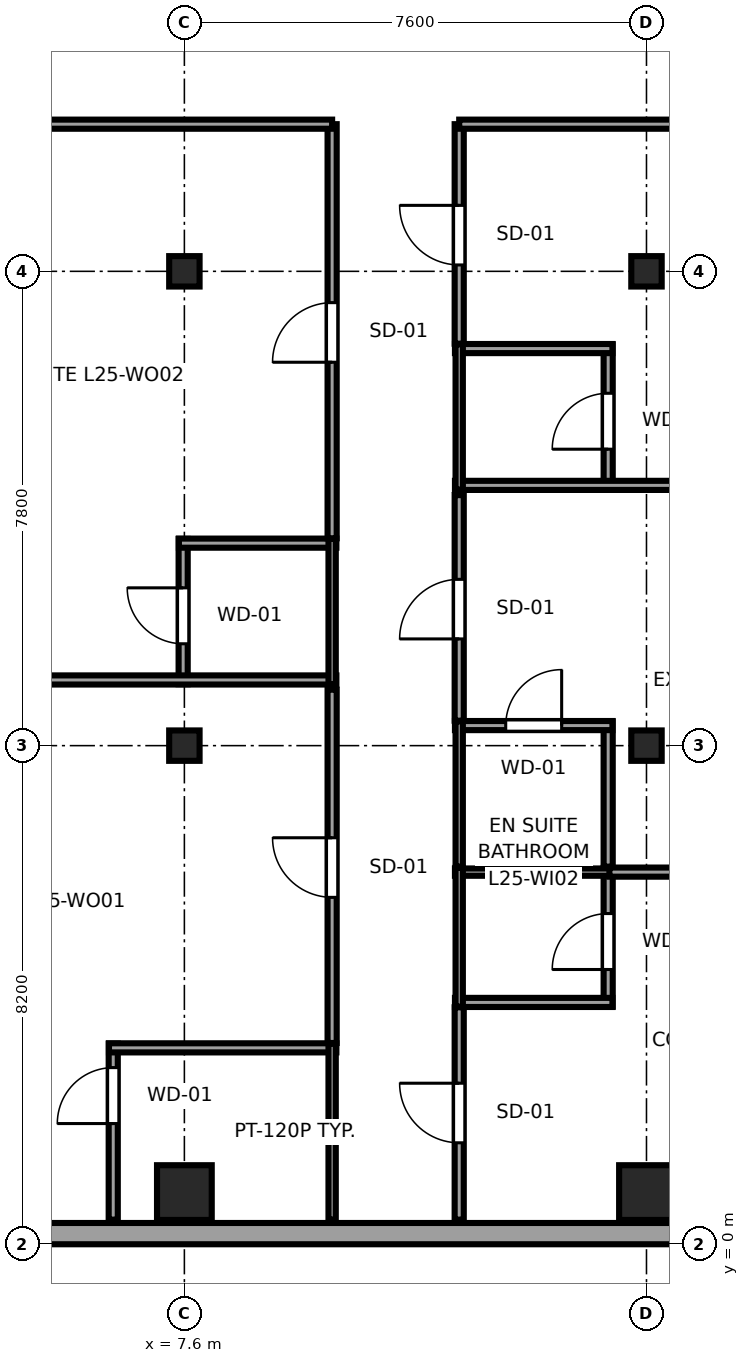
"""IFC4 building model, lengths in metres.
Left out: names, types, materials, properties, quantities, classifications, styles, units other than length and angle.
Written with IfcOpenShell. Run it as: python <this file> out.ifc"""

import sys

from ifc_helpers import new_model, si_unit, direction, frame, frame_2d, origin, origin_2d, place, context, subcontext, project, spatial, rectangle, i_section, extrude, source, transform, mapped, element, fill, save


model = new_model("IFC4")
c1 = context("Model", 3, precision=1e-05, world=origin(), true_north=direction((0.0, 1.0)))
c2 = subcontext(c1, "Body", "Model", "MODEL_VIEW")
j1 = project(units=[si_unit("LENGTHUNIT", "METRE"), si_unit("PLANEANGLEUNIT", "RADIAN")], contexts=[c1])
p1 = place(None, origin())
s1 = spatial("IfcSite", under=j1, at=p1, CompositionType="ELEMENT")
p2 = place(p1, origin())
s2 = spatial("IfcBuilding", under=s1, at=p2, CompositionType="ELEMENT")
p3 = place(p2, frame((0.0, 0.0, 100.9)))
s3 = spatial("IfcBuildingStorey", under=s2, at=p3, CompositionType="ELEMENT", Elevation=100.9)
m1 = source(origin(), c2, "Body", "SweptSolid", [
    extrude(rectangle(XDim=0.9, YDim=0.9, at=origin_2d()), origin(), (0.0, 0.0, 1.0), 3.55),
])
p4 = place(p3, frame((7.6, 0.85, 0.0), z_axis=(0.0, 0.0, 1.0), x_axis=(1.0, 0.0, 0.0)))
e1 = element("IfcColumn", 1, at=p4, inside=s3, PredefinedType="COLUMN", context=c2, shape_type="MappedRepresentation", body=[
    mapped(m1, transform((0.0, 0.0, 0.0), x_axis=(1.0, 0.0, 0.0), y_axis=(0.0, 1.0, 0.0), z_axis=(0.0, 0.0, 1.0), scale=1.0)),
])
m2 = source(origin(), c2, "Body", "SweptSolid", [
    extrude(i_section(OverallWidth=0.5, OverallDepth=0.5, WebThickness=0.022, FlangeThickness=0.034, at=origin_2d()), origin(), (0.0, 0.0, 1.0), 3.55),
])
for number, where, z_axis, x_axis in (
    (2, (7.6, 8.2, 0.0), (0.0, 0.0, 1.0), (1.0, 0.0, 0.0)),
    (3, (7.6, 16.0, 0.0), (0.0, 0.0, 1.0), (1.0, 0.0, 0.0)),
):
    element("IfcColumn", number, at=place(p3, frame(where, z_axis=z_axis, x_axis=x_axis)), inside=s3, PredefinedType="COLUMN", context=c2, shape_type="MappedRepresentation", body=[
        mapped(m2, transform((0.0, 0.0, 0.0), x_axis=(1.0, 0.0, 0.0), y_axis=(0.0, 1.0, 0.0), z_axis=(0.0, 0.0, 1.0), scale=1.0)),
    ])
p5 = place(p3, frame((15.2, 0.85, 0.0), z_axis=(0.0, 0.0, 1.0), x_axis=(1.0, 0.0, 0.0)))
e4 = element("IfcColumn", 4, at=p5, inside=s3, PredefinedType="COLUMN", context=c2, shape_type="MappedRepresentation", body=[
    mapped(m1, transform((0.0, 0.0, 0.0), x_axis=(1.0, 0.0, 0.0), y_axis=(0.0, 1.0, 0.0), z_axis=(0.0, 0.0, 1.0), scale=1.0)),
])
for number, where, z_axis, x_axis in (
    (5, (15.2, 8.2, 0.0), (0.0, 0.0, 1.0), (1.0, 0.0, 0.0)),
    (6, (15.2, 16.0, 0.0), (0.0, 0.0, 1.0), (1.0, 0.0, 0.0)),
):
    element("IfcColumn", number, at=place(p3, frame(where, z_axis=z_axis, x_axis=x_axis)), inside=s3, PredefinedType="COLUMN", context=c2, shape_type="MappedRepresentation", body=[
        mapped(m2, transform((0.0, 0.0, 0.0), x_axis=(1.0, 0.0, 0.0), y_axis=(0.0, 1.0, 0.0), z_axis=(0.0, 0.0, 1.0), scale=1.0)),
    ])
p6 = place(p3, frame((4.617, 0.175, 0.0), z_axis=(0.0, 0.0, 1.0), x_axis=(1.0, 0.0, 0.0)))
e7 = element("IfcWall", 7, at=p6, inside=s3, PredefinedType="SOLIDWALL", context=c2, shape_type="SweptSolid", body=[
    extrude(rectangle(XDim=18.008, YDim=0.35, at=frame_2d((9.004, 0.0))), origin(), (0.0, 0.0, 1.0), 3.37),
])
p7 = place(p6, frame((14.332, 0.0, 0.68)))
e8 = element("IfcOpeningElement", 8, at=p7, cuts=e7, PredefinedType="OPENING", context=c2, shape_type="SweptSolid", body=[
    extrude(rectangle(XDim=1.95, YDim=1.82, at=frame_2d((0.975, 0.91))), frame((0.0, 0.185, 0.0), z_axis=(0.0, -1.0, 0.0), x_axis=(1.0, 0.0, 0.0)), (0.0, 0.0, 1.0), 0.37),
])
p8 = place(p3, frame((6.43, 0.405, 0.0), z_axis=(0.0, 0.0, 1.0), x_axis=(0.0, 1.0, 0.0)))
e9 = element("IfcWall", 9, at=p8, inside=s3, PredefinedType="PARTITIONING", context=c2, shape_type="SweptSolid", body=[
    extrude(rectangle(XDim=2.895, YDim=0.15, at=frame_2d((1.448, 0.0))), origin(), (0.0, 0.0, 1.0), 3.37),
])
p9 = place(p8, frame((1.58, 0.0, 0.0)))
e10 = element("IfcOpeningElement", 10, at=p9, cuts=e9, PredefinedType="OPENING", context=c2, shape_type="SweptSolid", body=[
    extrude(rectangle(XDim=0.92, YDim=2.01, at=frame_2d((0.46, 1.005))), frame((0.0, 0.085, 0.0), z_axis=(0.0, -1.0, 0.0), x_axis=(1.0, 0.0, 0.0)), (0.0, 0.0, 1.0), 0.17),
])
p10 = place(p3, frame((6.36, 3.23, 0.0), z_axis=(0.0, 0.0, 1.0), x_axis=(1.0, 0.0, 0.0)))
e11 = element("IfcWall", 11, at=p10, inside=s3, PredefinedType="PARTITIONING", context=c2, shape_type="SweptSolid", body=[
    extrude(rectangle(XDim=3.74, YDim=0.15, at=frame_2d((1.87, 0.0))), origin(), (0.0, 0.0, 1.0), 3.37),
])
p11 = place(p3, frame((10.03, 0.405, 0.0), z_axis=(0.0, 0.0, 1.0), x_axis=(0.0, 1.0, 0.0)))
e12 = element("IfcWall", 12, at=p11, inside=s3, PredefinedType="PLUMBINGWALL", context=c2, shape_type="SweptSolid", body=[
    extrude(rectangle(XDim=2.895, YDim=0.12, at=frame_2d((1.448, 0.0))), origin(), (0.0, 0.0, 1.0), 3.37),
])
p12 = place(p3, frame((7.58, 9.21, 0.0), z_axis=(0.0, 0.0, 1.0), x_axis=(0.0, 1.0, 0.0)))
e13 = element("IfcWall", 13, at=p12, inside=s3, PredefinedType="PARTITIONING", context=c2, shape_type="SweptSolid", body=[
    extrude(rectangle(XDim=2.39, YDim=0.15, at=frame_2d((1.195, 0.0))), origin(), (0.0, 0.0, 1.0), 2.827),
])
p13 = place(p12, frame((0.665, 0.0, 0.0)))
e14 = element("IfcOpeningElement", 14, at=p13, cuts=e13, PredefinedType="OPENING", context=c2, shape_type="SweptSolid", body=[
    extrude(rectangle(XDim=0.92, YDim=2.01, at=frame_2d((0.46, 1.005))), frame((0.0, 0.085, 0.0), z_axis=(0.0, -1.0, 0.0), x_axis=(1.0, 0.0, 0.0)), (0.0, 0.0, 1.0), 0.17),
])
p14 = place(p3, frame((0.3, 9.28, 0.0), z_axis=(0.0, 0.0, 1.0), x_axis=(1.0, 0.0, 0.0)))
e15 = element("IfcWall", 15, at=p14, inside=s3, PredefinedType="PARTITIONING", context=c2, shape_type="SweptSolid", body=[
    extrude(rectangle(XDim=9.8, YDim=0.15, at=frame_2d((4.9, 0.0))), origin(), (0.0, 0.0, 1.0), 3.37),
])
p15 = place(p3, frame((7.51, 11.53, 0.0), z_axis=(0.0, 0.0, 1.0), x_axis=(1.0, 0.0, 0.0)))
e16 = element("IfcWall", 16, at=p15, inside=s3, PredefinedType="PARTITIONING", context=c2, shape_type="SweptSolid", body=[
    extrude(rectangle(XDim=2.59, YDim=0.15, at=frame_2d((1.295, 0.0))), origin(), (0.0, 0.0, 1.0), 3.37),
])
p16 = place(p3, frame((10.03, 9.21, 0.0), z_axis=(0.0, 0.0, 1.0), x_axis=(0.0, 1.0, 0.0)))
e17 = element("IfcWall", 17, at=p16, inside=s3, PredefinedType="PLUMBINGWALL", context=c2, shape_type="SweptSolid", body=[
    extrude(rectangle(XDim=2.39, YDim=0.12, at=frame_2d((1.195, 0.0))), origin(), (0.0, 0.0, 1.0), 3.37),
])
p17 = place(p3, frame((14.57, 3.907, 0.0), z_axis=(0.0, 0.0, 1.0), x_axis=(0.0, 1.0, 0.0)))
e18 = element("IfcWall", 18, at=p17, inside=s3, PredefinedType="PARTITIONING", context=c2, shape_type="SweptSolid", body=[
    extrude(rectangle(XDim=2.283, YDim=0.15, at=frame_2d((1.142, 0.0))), origin(), (0.0, 0.0, 1.0), 3.37),
])
p18 = place(p17, frame((0.612, 0.0, 0.0)))
e19 = element("IfcOpeningElement", 19, at=p18, cuts=e18, PredefinedType="OPENING", context=c2, shape_type="SweptSolid", body=[
    extrude(rectangle(XDim=0.92, YDim=2.01, at=frame_2d((0.46, 1.005))), frame((0.0, 0.085, 0.0), z_axis=(0.0, -1.0, 0.0), x_axis=(1.0, 0.0, 0.0)), (0.0, 0.0, 1.0), 0.17),
])
p19 = place(p3, frame((12.05, 3.977, 0.0), z_axis=(0.0, 0.0, 1.0), x_axis=(1.0, 0.0, 0.0)))
e20 = element("IfcWall", 20, at=p19, inside=s3, PredefinedType="PARTITIONING", context=c2, shape_type="SweptSolid", body=[
    extrude(rectangle(XDim=2.59, YDim=0.15, at=frame_2d((1.295, 0.0))), origin(), (0.0, 0.0, 1.0), 3.37),
])
p20 = place(p3, frame((12.05, 6.12, 0.0), z_axis=(0.0, 0.0, 1.0), x_axis=(1.0, 0.0, 0.0)))
e21 = element("IfcWall", 21, at=p20, inside=s3, PredefinedType="PLUMBINGWALL", context=c2, shape_type="SweptSolid", body=[
    extrude(rectangle(XDim=2.59, YDim=0.12, at=frame_2d((1.295, 0.0))), origin(), (0.0, 0.0, 1.0), 3.37),
])
p21 = place(p3, frame((12.12, 3.907, 0.0), z_axis=(0.0, 0.0, 1.0), x_axis=(0.0, 1.0, 0.0)))
e22 = element("IfcWall", 22, at=p21, inside=s3, PredefinedType="PLUMBINGWALL", context=c2, shape_type="SweptSolid", body=[
    extrude(rectangle(XDim=2.283, YDim=0.12, at=frame_2d((1.142, 0.0))), origin(), (0.0, 0.0, 1.0), 3.37),
])
p22 = place(p3, frame((14.57, 6.21, 0.0), z_axis=(0.0, 0.0, 1.0), x_axis=(0.0, 1.0, 0.0)))
e23 = element("IfcWall", 23, at=p22, inside=s3, PredefinedType="PARTITIONING", context=c2, shape_type="SweptSolid", body=[
    extrude(rectangle(XDim=2.39, YDim=0.15, at=frame_2d((1.195, 0.0))), origin(), (0.0, 0.0, 1.0), 3.37),
])
p23 = place(p3, frame((12.05, 8.53, 0.0), z_axis=(0.0, 0.0, 1.0), x_axis=(1.0, 0.0, 0.0)))
e24 = element("IfcWall", 24, at=p23, inside=s3, PredefinedType="PARTITIONING", context=c2, shape_type="SweptSolid", body=[
    extrude(rectangle(XDim=2.59, YDim=0.15, at=frame_2d((1.295, 0.0))), origin(), (0.0, 0.0, 1.0), 3.37),
])
p24 = place(p23, frame((0.835, 0.0, 0.0)))
e25 = element("IfcOpeningElement", 25, at=p24, cuts=e24, PredefinedType="OPENING", context=c2, shape_type="SweptSolid", body=[
    extrude(rectangle(XDim=0.92, YDim=2.01, at=frame_2d((0.46, 1.005))), frame((0.0, 0.085, 0.0), z_axis=(0.0, -1.0, 0.0), x_axis=(1.0, 0.0, 0.0)), (0.0, 0.0, 1.0), 0.17),
])
p25 = place(p3, frame((12.12, 6.21, 0.0), z_axis=(0.0, 0.0, 1.0), x_axis=(0.0, 1.0, 0.0)))
e26 = element("IfcWall", 26, at=p25, inside=s3, PredefinedType="PLUMBINGWALL", context=c2, shape_type="SweptSolid", body=[
    extrude(rectangle(XDim=2.39, YDim=0.12, at=frame_2d((1.195, 0.0))), origin(), (0.0, 0.0, 1.0), 3.37),
])
p26 = place(p3, frame((14.57, 12.41, 0.0), z_axis=(0.0, 0.0, 1.0), x_axis=(0.0, 1.0, 0.0)))
e27 = element("IfcWall", 27, at=p26, inside=s3, PredefinedType="PARTITIONING", context=c2, shape_type="SweptSolid", body=[
    extrude(rectangle(XDim=2.39, YDim=0.15, at=frame_2d((1.195, 0.0))), origin(), (0.0, 0.0, 1.0), 3.37),
])
p27 = place(p26, frame((0.665, 0.0, 0.0)))
e28 = element("IfcOpeningElement", 28, at=p27, cuts=e27, PredefinedType="OPENING", context=c2, shape_type="SweptSolid", body=[
    extrude(rectangle(XDim=0.92, YDim=2.01, at=frame_2d((0.46, 1.005))), frame((0.0, 0.085, 0.0), z_axis=(0.0, -1.0, 0.0), x_axis=(1.0, 0.0, 0.0)), (0.0, 0.0, 1.0), 0.17),
])
p28 = place(p3, frame((12.05, 12.48, 0.0), z_axis=(0.0, 0.0, 1.0), x_axis=(1.0, 0.0, 0.0)))
e29 = element("IfcWall", 29, at=p28, inside=s3, PredefinedType="PARTITIONING", context=c2, shape_type="SweptSolid", body=[
    extrude(rectangle(XDim=10.3, YDim=0.15, at=frame_2d((5.15, 0.0))), origin(), (0.0, 0.0, 1.0), 3.37),
])
p29 = place(p3, frame((12.05, 14.73, 0.0), z_axis=(0.0, 0.0, 1.0), x_axis=(1.0, 0.0, 0.0)))
e30 = element("IfcWall", 30, at=p29, inside=s3, PredefinedType="PARTITIONING", context=c2, shape_type="SweptSolid", body=[
    extrude(rectangle(XDim=2.59, YDim=0.15, at=frame_2d((1.295, 0.0))), origin(), (0.0, 0.0, 1.0), 3.37),
])
p30 = place(p3, frame((12.12, 12.41, 0.0), z_axis=(0.0, 0.0, 1.0), x_axis=(0.0, 1.0, 0.0)))
e31 = element("IfcWall", 31, at=p30, inside=s3, PredefinedType="PLUMBINGWALL", context=c2, shape_type="SweptSolid", body=[
    extrude(rectangle(XDim=2.39, YDim=0.12, at=frame_2d((1.195, 0.0))), origin(), (0.0, 0.0, 1.0), 3.37),
])
p31 = place(p3, frame((10.03, 3.31, 0.0), z_axis=(0.0, 0.0, 1.0), x_axis=(0.0, 1.0, 0.0)))
e32 = element("IfcWall", 32, at=p31, inside=s3, PredefinedType="PARTITIONING", context=c2, shape_type="SweptSolid", body=[
    extrude(rectangle(XDim=5.81, YDim=0.15, at=frame_2d((2.905, 0.0))), origin(), (0.0, 0.0, 1.0), 3.37),
])
p32 = place(p31, frame((2.395, 0.0, 0.0)))
e33 = element("IfcOpeningElement", 33, at=p32, cuts=e32, PredefinedType="OPENING", context=c2, shape_type="SweptSolid", body=[
    extrude(rectangle(XDim=0.98, YDim=2.12, at=frame_2d((0.49, 1.06))), frame((0.0, 0.085, 0.0), z_axis=(0.0, -1.0, 0.0), x_axis=(1.0, 0.0, 0.0)), (0.0, 0.0, 1.0), 0.17),
])
p33 = place(p3, frame((10.03, 11.61, 0.0), z_axis=(0.0, 0.0, 1.0), x_axis=(0.0, 1.0, 0.0)))
e34 = element("IfcWall", 34, at=p33, inside=s3, PredefinedType="PARTITIONING", context=c2, shape_type="SweptSolid", body=[
    extrude(rectangle(XDim=6.81, YDim=0.15, at=frame_2d((3.405, 0.0))), origin(), (0.0, 0.0, 1.0), 3.37),
])
p34 = place(p33, frame((2.895, 0.0, 0.0)))
e35 = element("IfcOpeningElement", 35, at=p34, cuts=e34, PredefinedType="OPENING", context=c2, shape_type="SweptSolid", body=[
    extrude(rectangle(XDim=0.98, YDim=2.12, at=frame_2d((0.49, 1.06))), frame((0.0, 0.085, 0.0), z_axis=(0.0, -1.0, 0.0), x_axis=(1.0, 0.0, 0.0)), (0.0, 0.0, 1.0), 0.17),
])
p35 = place(p3, frame((0.3, 18.42, 0.0), z_axis=(0.0, 0.0, 1.0), x_axis=(1.0, 0.0, 0.0)))
e36 = element("IfcWall", 36, at=p35, inside=s3, PredefinedType="PARTITIONING", context=c2, shape_type="SweptSolid", body=[
    extrude(rectangle(XDim=9.73, YDim=0.15, at=frame_2d((4.865, 0.0))), origin(), (0.0, 0.0, 1.0), 3.37),
])
p36 = place(p3, frame((12.12, 0.405, 0.0), z_axis=(0.0, 0.0, 1.0), x_axis=(0.0, 1.0, 0.0)))
e37 = element("IfcWall", 37, at=p36, inside=s3, PredefinedType="PARTITIONING", context=c2, shape_type="SweptSolid", body=[
    extrude(rectangle(XDim=3.492, YDim=0.15, at=frame_2d((1.746, 0.0))), origin(), (0.0, 0.0, 1.0), 3.37),
])
p37 = place(p36, frame((1.263, 0.0, 0.0)))
e38 = element("IfcOpeningElement", 38, at=p37, cuts=e37, PredefinedType="OPENING", context=c2, shape_type="SweptSolid", body=[
    extrude(rectangle(XDim=0.98, YDim=2.12, at=frame_2d((0.49, 1.06))), frame((0.0, 0.085, 0.0), z_axis=(0.0, -1.0, 0.0), x_axis=(1.0, 0.0, 0.0)), (0.0, 0.0, 1.0), 0.17),
])
p38 = place(p3, frame((14.59, 6.12, 0.0), z_axis=(0.0, 0.0, 1.0), x_axis=(1.0, 0.0, 0.0)))
e39 = element("IfcWall", 39, at=p38, inside=s3, PredefinedType="PARTITIONING", context=c2, shape_type="SweptSolid", body=[
    extrude(rectangle(XDim=7.76, YDim=0.15, at=frame_2d((3.88, 0.0))), origin(), (0.0, 0.0, 1.0), 3.37),
])
p39 = place(p3, frame((12.12, 8.61, 0.0), z_axis=(0.0, 0.0, 1.0), x_axis=(0.0, 1.0, 0.0)))
e40 = element("IfcWall", 40, at=p39, inside=s3, PredefinedType="PARTITIONING", context=c2, shape_type="SweptSolid", body=[
    extrude(rectangle(XDim=3.71, YDim=0.15, at=frame_2d((1.855, 0.0))), origin(), (0.0, 0.0, 1.0), 3.37),
])
p40 = place(p39, frame((1.345, 0.0, 0.0)))
e41 = element("IfcOpeningElement", 41, at=p40, cuts=e40, PredefinedType="OPENING", context=c2, shape_type="SweptSolid", body=[
    extrude(rectangle(XDim=0.98, YDim=2.12, at=frame_2d((0.49, 1.06))), frame((0.0, 0.085, 0.0), z_axis=(0.0, -1.0, 0.0), x_axis=(1.0, 0.0, 0.0)), (0.0, 0.0, 1.0), 0.17),
])
p41 = place(p3, frame((12.12, 14.81, 0.0), z_axis=(0.0, 0.0, 1.0), x_axis=(0.0, 1.0, 0.0)))
e42 = element("IfcWall", 42, at=p41, inside=s3, PredefinedType="PARTITIONING", context=c2, shape_type="SweptSolid", body=[
    extrude(rectangle(XDim=3.61, YDim=0.15, at=frame_2d((1.805, 0.0))), origin(), (0.0, 0.0, 1.0), 3.37),
])
p42 = place(p41, frame((1.295, 0.0, 0.0)))
e43 = element("IfcOpeningElement", 43, at=p42, cuts=e42, PredefinedType="OPENING", context=c2, shape_type="SweptSolid", body=[
    extrude(rectangle(XDim=0.98, YDim=2.12, at=frame_2d((0.49, 1.06))), frame((0.0, 0.085, 0.0), z_axis=(0.0, -1.0, 0.0), x_axis=(1.0, 0.0, 0.0)), (0.0, 0.0, 1.0), 0.17),
])
p43 = place(p3, frame((12.12, 18.42, 0.0), z_axis=(0.0, 0.0, 1.0), x_axis=(1.0, 0.0, 0.0)))
e44 = element("IfcWall", 44, at=p43, inside=s3, PredefinedType="PARTITIONING", context=c2, shape_type="SweptSolid", body=[
    extrude(rectangle(XDim=10.23, YDim=0.15, at=frame_2d((5.115, 0.0))), origin(), (0.0, 0.0, 1.0), 3.37),
])
m3 = source(origin(), c2, "Body", "SweptSolid", [
    extrude(rectangle(XDim=0.92, YDim=2.01, at=frame_2d((0.46, 1.005))), frame((0.0, 0.025, 0.0), z_axis=(0.0, -1.0, 0.0), x_axis=(1.0, 0.0, 0.0)), (0.0, 0.0, 1.0), 0.05),
])
p44 = place(p9, origin())
e45 = element("IfcDoor", 45, at=p44, inside=s3, OperationType="SINGLE_SWING_LEFT", PredefinedType="DOOR", context=c2, shape_type="MappedRepresentation", body=[
    mapped(m3, transform((0.0, 0.0, 0.0), x_axis=(1.0, 0.0, 0.0), y_axis=(0.0, 1.0, 0.0), z_axis=(0.0, 0.0, 1.0), scale=1.0)),
])
fill(e10, e45)
p45 = place(p13, origin())
e46 = element("IfcDoor", 46, at=p45, inside=s3, OperationType="SINGLE_SWING_RIGHT", PredefinedType="DOOR", context=c2, shape_type="MappedRepresentation", body=[
    mapped(m3, transform((0.0, 0.0, 0.0), x_axis=(1.0, 0.0, 0.0), y_axis=(0.0, 1.0, 0.0), z_axis=(0.0, 0.0, 1.0), scale=1.0)),
])
fill(e14, e46)
p46 = place(p18, origin())
e47 = element("IfcDoor", 47, at=p46, inside=s3, OperationType="SINGLE_SWING_LEFT", PredefinedType="DOOR", context=c2, shape_type="MappedRepresentation", body=[
    mapped(m3, transform((0.0, 0.0, 0.0), x_axis=(1.0, 0.0, 0.0), y_axis=(0.0, 1.0, 0.0), z_axis=(0.0, 0.0, 1.0), scale=1.0)),
])
fill(e19, e47)
p47 = place(p24, origin())
e48 = element("IfcDoor", 48, at=p47, inside=s3, OperationType="SINGLE_SWING_RIGHT", PredefinedType="DOOR", context=c2, shape_type="MappedRepresentation", body=[
    mapped(m3, transform((0.0, 0.0, 0.0), x_axis=(1.0, 0.0, 0.0), y_axis=(0.0, 1.0, 0.0), z_axis=(0.0, 0.0, 1.0), scale=1.0)),
])
fill(e25, e48)
p48 = place(p27, origin())
e49 = element("IfcDoor", 49, at=p48, inside=s3, OperationType="SINGLE_SWING_LEFT", PredefinedType="DOOR", context=c2, shape_type="MappedRepresentation", body=[
    mapped(m3, transform((0.0, 0.0, 0.0), x_axis=(1.0, 0.0, 0.0), y_axis=(0.0, 1.0, 0.0), z_axis=(0.0, 0.0, 1.0), scale=1.0)),
])
fill(e28, e49)
m4 = source(origin(), c2, "Body", "SweptSolid", [
    extrude(rectangle(XDim=0.98, YDim=2.12, at=frame_2d((0.49, 1.06))), frame((0.0, 0.025, 0.0), z_axis=(0.0, -1.0, 0.0), x_axis=(1.0, 0.0, 0.0)), (0.0, 0.0, 1.0), 0.05),
])
p49 = place(p32, origin())
e50 = element("IfcDoor", 50, at=p49, inside=s3, OperationType="SINGLE_SWING_RIGHT", PredefinedType="DOOR", context=c2, shape_type="MappedRepresentation", body=[
    mapped(m4, transform((0.0, 0.0, 0.0), x_axis=(1.0, 0.0, 0.0), y_axis=(0.0, 1.0, 0.0), z_axis=(0.0, 0.0, 1.0), scale=1.0)),
])
fill(e33, e50)
p50 = place(p34, origin())
e51 = element("IfcDoor", 51, at=p50, inside=s3, OperationType="SINGLE_SWING_LEFT", PredefinedType="DOOR", context=c2, shape_type="MappedRepresentation", body=[
    mapped(m4, transform((0.0, 0.0, 0.0), x_axis=(1.0, 0.0, 0.0), y_axis=(0.0, 1.0, 0.0), z_axis=(0.0, 0.0, 1.0), scale=1.0)),
])
fill(e35, e51)
p51 = place(p37, origin())
e52 = element("IfcDoor", 52, at=p51, inside=s3, OperationType="SINGLE_SWING_RIGHT", PredefinedType="DOOR", context=c2, shape_type="MappedRepresentation", body=[
    mapped(m4, transform((0.0, 0.0, 0.0), x_axis=(1.0, 0.0, 0.0), y_axis=(0.0, 1.0, 0.0), z_axis=(0.0, 0.0, 1.0), scale=1.0)),
])
fill(e38, e52)
p52 = place(p40, origin())
e53 = element("IfcDoor", 53, at=p52, inside=s3, OperationType="SINGLE_SWING_LEFT", PredefinedType="DOOR", context=c2, shape_type="MappedRepresentation", body=[
    mapped(m4, transform((0.0, 0.0, 0.0), x_axis=(1.0, 0.0, 0.0), y_axis=(0.0, 1.0, 0.0), z_axis=(0.0, 0.0, 1.0), scale=1.0)),
])
fill(e41, e53)
p53 = place(p42, origin())
e54 = element("IfcDoor", 54, at=p53, inside=s3, OperationType="SINGLE_SWING_RIGHT", PredefinedType="DOOR", context=c2, shape_type="MappedRepresentation", body=[
    mapped(m4, transform((0.0, 0.0, 0.0), x_axis=(1.0, 0.0, 0.0), y_axis=(0.0, 1.0, 0.0), z_axis=(0.0, 0.0, 1.0), scale=1.0)),
])
fill(e43, e54)
save(model, sys.argv[1])
